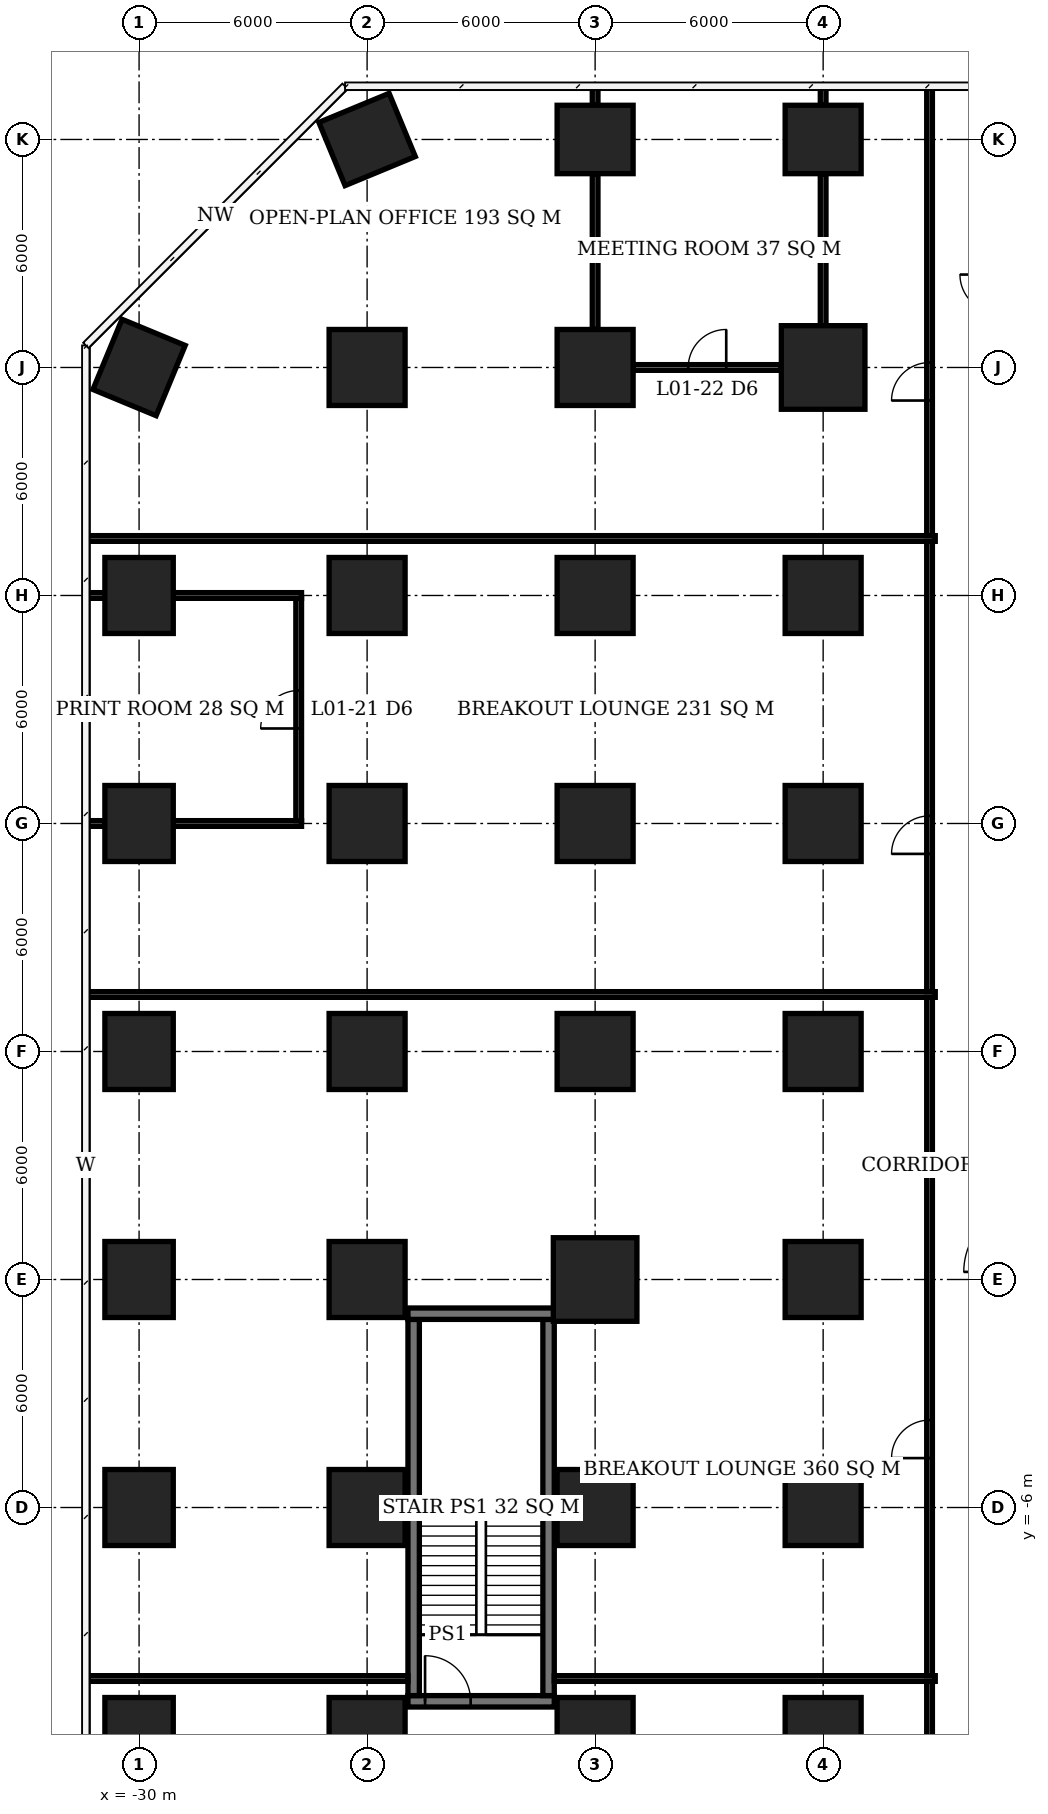
"""IFC4 building model, lengths in metres.
Left out: names, types, materials, properties, quantities, classifications, styles, units other than length and angle.
Written with IfcOpenShell. Run it as: python <this file> out.ifc"""

import sys

from ifc_helpers import new_model, si_unit, direction, frame, frame_2d, origin, origin_2d, place, context, subcontext, project, spatial, rectangle, extrude, element, fill, save


model = new_model("IFC4")
c1 = context("Model", 3, precision=1e-05, world=origin(), true_north=direction((0.0, 1.0)))
c2 = subcontext(c1, "Body", "Model", "MODEL_VIEW")
j1 = project(units=[si_unit("LENGTHUNIT", "METRE"), si_unit("PLANEANGLEUNIT", "RADIAN")], contexts=[c1])
p1 = place(None, origin())
s1 = spatial("IfcSite", under=j1, at=p1, CompositionType="ELEMENT")
p2 = place(p1, origin())
s2 = spatial("IfcBuilding", under=s1, at=p2, CompositionType="ELEMENT")
p3 = place(p2, frame((0.0, 0.0, 6.0)))
s3 = spatial("IfcBuildingStorey", under=s2, at=p3, CompositionType="ELEMENT", Elevation=6.0)
for number, where, z_axis, x_axis in (
    (1, (-30.0, -12.0, 0.0), (0.0, 0.0, 1.0), (0.0, 1.0, 0.0)),
    (2, (-30.0, -6.0, 0.0), (0.0, 0.0, 1.0), (0.0, 1.0, 0.0)),
    (3, (-30.0, 0.0, 0.0), (0.0, 0.0, 1.0), (0.0, 1.0, 0.0)),
    (4, (-30.0, 6.0, 0.0), (0.0, 0.0, 1.0), (0.0, 1.0, 0.0)),
    (5, (-30.0, 12.0, 0.0), (0.0, 0.0, 1.0), (0.0, 1.0, 0.0)),
    (6, (-30.0, 18.0, 0.0), (0.0, 0.0, 1.0), (0.0, 1.0, 0.0)),
    (7, (-30.0, 24.0, 0.0), (0.0, 0.0, 1.0), (0.383, 0.924, 0.0)),
):
    element("IfcColumn", number, at=place(p3, frame(where, z_axis=z_axis, x_axis=x_axis)), inside=s3, PredefinedType="COLUMN", context=c2, shape_type="SweptSolid", body=[
        extrude(rectangle(XDim=2.0, YDim=1.8, at=origin_2d()), origin(), (0.0, 0.0, 1.0), 5.0),
    ])
for number, where, z_axis, x_axis in (
    (8, (-24.0, -12.0, 0.0), (0.0, 0.0, 1.0), (1.0, 0.0, 0.0)),
    (9, (-24.0, -6.0, 0.0), (0.0, 0.0, 1.0), (1.0, 0.0, 0.0)),
    (10, (-24.0, 0.0, 0.0), (0.0, 0.0, 1.0), (1.0, 0.0, 0.0)),
    (11, (-24.0, 6.0, 0.0), (0.0, 0.0, 1.0), (1.0, 0.0, 0.0)),
    (12, (-24.0, 12.0, 0.0), (0.0, 0.0, 1.0), (1.0, 0.0, 0.0)),
    (13, (-24.0, 18.0, 0.0), (0.0, 0.0, 1.0), (1.0, 0.0, 0.0)),
    (14, (-24.0, 24.0, 0.0), (0.0, 0.0, 1.0), (1.0, 0.0, 0.0)),
):
    element("IfcColumn", number, at=place(p3, frame(where, z_axis=z_axis, x_axis=x_axis)), inside=s3, PredefinedType="COLUMN", context=c2, shape_type="SweptSolid", body=[
        extrude(rectangle(XDim=2.0, YDim=2.0, at=origin_2d()), origin(), (0.0, 0.0, 1.0), 5.0),
    ])
p4 = place(p3, frame((-24.0, 30.0, 0.0), z_axis=(0.0, 0.0, 1.0), x_axis=(0.923879532511, 0.382683432365, 0.0)))
e15 = element("IfcColumn", 15, at=p4, inside=s3, PredefinedType="COLUMN", context=c2, shape_type="SweptSolid", body=[
    extrude(rectangle(XDim=2.0, YDim=1.8, at=origin_2d()), origin(), (0.0, 0.0, 1.0), 5.0),
])
for number, where, z_axis, x_axis in (
    (16, (-18.0, -12.0, 0.0), (0.0, 0.0, 1.0), (1.0, 0.0, 0.0)),
    (17, (-18.0, -6.0, 0.0), (0.0, 0.0, 1.0), (1.0, 0.0, 0.0)),
):
    element("IfcColumn", number, at=place(p3, frame(where, z_axis=z_axis, x_axis=x_axis)), inside=s3, PredefinedType="COLUMN", context=c2, shape_type="SweptSolid", body=[
        extrude(rectangle(XDim=2.0, YDim=2.0, at=origin_2d()), origin(), (0.0, 0.0, 1.0), 5.0),
    ])
p5 = place(p3, frame((-18.0, 0.0, 0.0), z_axis=(0.0, 0.0, 1.0), x_axis=(1.0, 0.0, 0.0)))
e18 = element("IfcColumn", 18, at=p5, inside=s3, PredefinedType="COLUMN", context=c2, shape_type="SweptSolid", body=[
    extrude(rectangle(XDim=2.2, YDim=2.2, at=origin_2d()), origin(), (0.0, 0.0, 1.0), 5.0),
])
for number, where, z_axis, x_axis in (
    (19, (-18.0, 6.0, 0.0), (0.0, 0.0, 1.0), (1.0, 0.0, 0.0)),
    (20, (-18.0, 12.0, 0.0), (0.0, 0.0, 1.0), (1.0, 0.0, 0.0)),
    (21, (-18.0, 18.0, 0.0), (0.0, 0.0, 1.0), (1.0, 0.0, 0.0)),
    (22, (-18.0, 24.0, 0.0), (0.0, 0.0, 1.0), (1.0, 0.0, 0.0)),
):
    element("IfcColumn", number, at=place(p3, frame(where, z_axis=z_axis, x_axis=x_axis)), inside=s3, PredefinedType="COLUMN", context=c2, shape_type="SweptSolid", body=[
        extrude(rectangle(XDim=2.0, YDim=2.0, at=origin_2d()), origin(), (0.0, 0.0, 1.0), 5.0),
    ])
p6 = place(p3, frame((-18.0, 30.0, 0.0), z_axis=(0.0, 0.0, 1.0), x_axis=(1.0, 0.0, 0.0)))
e23 = element("IfcColumn", 23, at=p6, inside=s3, PredefinedType="COLUMN", context=c2, shape_type="SweptSolid", body=[
    extrude(rectangle(XDim=2.0, YDim=1.8, at=origin_2d()), origin(), (0.0, 0.0, 1.0), 5.0),
])
for number, where, z_axis, x_axis in (
    (24, (-12.0, -12.0, 0.0), (0.0, 0.0, 1.0), (1.0, 0.0, 0.0)),
    (25, (-12.0, -6.0, 0.0), (0.0, 0.0, 1.0), (1.0, 0.0, 0.0)),
    (26, (-12.0, 0.0, 0.0), (0.0, 0.0, 1.0), (1.0, 0.0, 0.0)),
    (27, (-12.0, 6.0, 0.0), (0.0, 0.0, 1.0), (1.0, 0.0, 0.0)),
    (28, (-12.0, 12.0, 0.0), (0.0, 0.0, 1.0), (1.0, 0.0, 0.0)),
    (29, (-12.0, 18.0, 0.0), (0.0, 0.0, 1.0), (1.0, 0.0, 0.0)),
):
    element("IfcColumn", number, at=place(p3, frame(where, z_axis=z_axis, x_axis=x_axis)), inside=s3, PredefinedType="COLUMN", context=c2, shape_type="SweptSolid", body=[
        extrude(rectangle(XDim=2.0, YDim=2.0, at=origin_2d()), origin(), (0.0, 0.0, 1.0), 5.0),
    ])
p7 = place(p3, frame((-12.0, 24.0, 0.0), z_axis=(0.0, 0.0, 1.0), x_axis=(1.0, 0.0, 0.0)))
e30 = element("IfcColumn", 30, at=p7, inside=s3, PredefinedType="COLUMN", context=c2, shape_type="SweptSolid", body=[
    extrude(rectangle(XDim=2.2, YDim=2.2, at=origin_2d()), origin(), (0.0, 0.0, 1.0), 5.0),
])
p8 = place(p3, frame((-12.0, 30.0, 0.0), z_axis=(0.0, 0.0, 1.0), x_axis=(1.0, 0.0, 0.0)))
e31 = element("IfcColumn", 31, at=p8, inside=s3, PredefinedType="COLUMN", context=c2, shape_type="SweptSolid", body=[
    extrude(rectangle(XDim=2.0, YDim=1.8, at=origin_2d()), origin(), (0.0, 0.0, 1.0), 5.0),
])
p9 = place(p3, frame((-22.925, -11.1, 0.0), z_axis=(0.0, 0.0, 1.0), x_axis=(1.0, 0.0, 0.0)))
e32 = element("IfcWall", 32, at=p9, inside=s3, PredefinedType="SOLIDWALL", context=c2, shape_type="SweptSolid", body=[
    extrude(rectangle(XDim=3.85, YDim=0.3, at=frame_2d((1.925, 0.0))), origin(), (0.0, 0.0, 1.0), 4.75),
])
p10 = place(p9, frame((0.45, 0.0, 0.0)))
e33 = element("IfcOpeningElement", 33, at=p10, cuts=e32, PredefinedType="OPENING", context=c2, shape_type="SweptSolid", body=[
    extrude(rectangle(XDim=1.2, YDim=2.1, at=frame_2d((0.6, 1.05))), frame((0.0, 0.16, 0.0), z_axis=(0.0, -1.0, 0.0), x_axis=(1.0, 0.0, 0.0)), (0.0, 0.0, 1.0), 0.32),
])
p11 = place(p3, frame((-22.925, -0.9, 0.0), z_axis=(0.0, 0.0, 1.0), x_axis=(1.0, 0.0, 0.0)))
e34 = element("IfcWall", 34, at=p11, inside=s3, PredefinedType="SOLIDWALL", context=c2, shape_type="SweptSolid", body=[
    extrude(rectangle(XDim=3.85, YDim=0.3, at=frame_2d((1.925, 0.0))), origin(), (0.0, 0.0, 1.0), 4.75),
])
for number, where, z_axis, x_axis in (
    (35, (-22.775, -10.95, 0.0), (0.0, 0.0, 1.0), (0.0, 1.0, 0.0)),
    (36, (-19.225, -10.95, 0.0), (0.0, 0.0, 1.0), (0.0, 1.0, 0.0)),
):
    element("IfcWall", number, at=place(p3, frame(where, z_axis=z_axis, x_axis=x_axis)), inside=s3, PredefinedType="SOLIDWALL", context=c2, shape_type="SweptSolid", body=[
        extrude(rectangle(XDim=9.9, YDim=0.3, at=frame_2d((4.95, 0.0))), origin(), (0.0, 0.0, 1.0), 4.75),
    ])
p12 = place(p3, frame((-31.375, 12.0, 0.0), z_axis=(0.0, 0.0, 1.0), x_axis=(1.0, 0.0, 0.0)))
e37 = element("IfcWall", 37, at=p12, inside=s3, PredefinedType="PARTITIONING", context=c2, shape_type="SweptSolid", body=[
    extrude(rectangle(XDim=0.475, YDim=0.15, at=frame_2d((0.238, 0.0))), origin(), (0.0, 0.0, 1.0), 4.75),
])
p13 = place(p3, frame((-29.1, 12.0, 0.0), z_axis=(0.0, 0.0, 1.0), x_axis=(1.0, 0.0, 0.0)))
e38 = element("IfcWall", 38, at=p13, inside=s3, PredefinedType="PARTITIONING", context=c2, shape_type="SweptSolid", body=[
    extrude(rectangle(XDim=3.375, YDim=0.15, at=frame_2d((1.688, 0.0))), origin(), (0.0, 0.0, 1.0), 4.75),
])
p14 = place(p3, frame((-31.375, 18.0, 0.0), z_axis=(0.0, 0.0, 1.0), x_axis=(1.0, 0.0, 0.0)))
e39 = element("IfcWall", 39, at=p14, inside=s3, PredefinedType="PARTITIONING", context=c2, shape_type="SweptSolid", body=[
    extrude(rectangle(XDim=0.475, YDim=0.15, at=frame_2d((0.238, 0.0))), origin(), (0.0, 0.0, 1.0), 4.75),
])
p15 = place(p3, frame((-29.1, 18.0, 0.0), z_axis=(0.0, 0.0, 1.0), x_axis=(1.0, 0.0, 0.0)))
e40 = element("IfcWall", 40, at=p15, inside=s3, PredefinedType="PARTITIONING", context=c2, shape_type="SweptSolid", body=[
    extrude(rectangle(XDim=3.375, YDim=0.15, at=frame_2d((1.688, 0.0))), origin(), (0.0, 0.0, 1.0), 4.75),
])
p16 = place(p3, frame((-17.0, 24.0, 0.0), z_axis=(0.0, 0.0, 1.0), x_axis=(1.0, 0.0, 0.0)))
e41 = element("IfcWall", 41, at=p16, inside=s3, PredefinedType="PARTITIONING", context=c2, shape_type="SweptSolid", body=[
    extrude(rectangle(XDim=3.9, YDim=0.15, at=frame_2d((1.95, 0.0))), origin(), (0.0, 0.0, 1.0), 4.75),
])
p17 = place(p16, frame((1.45, 0.0, 0.0)))
e42 = element("IfcOpeningElement", 42, at=p17, cuts=e41, PredefinedType="OPENING", context=c2, shape_type="SweptSolid", body=[
    extrude(rectangle(XDim=1.0, YDim=2.1, at=frame_2d((0.5, 1.05))), frame((0.0, 0.085, 0.0), z_axis=(0.0, -1.0, 0.0), x_axis=(1.0, 0.0, 0.0)), (0.0, 0.0, 1.0), 0.17),
])
p18 = place(p3, frame((-25.8, 12.075, 0.0), z_axis=(0.0, 0.0, 1.0), x_axis=(0.0, 1.0, 0.0)))
e43 = element("IfcWall", 43, at=p18, inside=s3, PredefinedType="PARTITIONING", context=c2, shape_type="SweptSolid", body=[
    extrude(rectangle(XDim=5.85, YDim=0.15, at=frame_2d((2.925, 0.0))), origin(), (0.0, 0.0, 1.0), 4.75),
])
p19 = place(p18, frame((2.425, 0.0, 0.0)))
e44 = element("IfcOpeningElement", 44, at=p19, cuts=e43, PredefinedType="OPENING", context=c2, shape_type="SweptSolid", body=[
    extrude(rectangle(XDim=1.0, YDim=2.1, at=frame_2d((0.5, 1.05))), frame((0.0, 0.085, 0.0), z_axis=(0.0, -1.0, 0.0), x_axis=(1.0, 0.0, 0.0)), (0.0, 0.0, 1.0), 0.17),
])
p20 = place(p3, frame((-18.0, 25.0, 0.0), z_axis=(0.0, 0.0, 1.0), x_axis=(0.0, 1.0, 0.0)))
e45 = element("IfcWall", 45, at=p20, inside=s3, PredefinedType="PARTITIONING", context=c2, shape_type="SweptSolid", body=[
    extrude(rectangle(XDim=4.1, YDim=0.15, at=frame_2d((2.05, 0.0))), origin(), (0.0, 0.0, 1.0), 4.75),
])
p21 = place(p3, frame((-18.0, 30.9, 0.0), z_axis=(0.0, 0.0, 1.0), x_axis=(0.0, 1.0, 0.0)))
e46 = element("IfcWall", 46, at=p21, inside=s3, PredefinedType="PARTITIONING", context=c2, shape_type="SweptSolid", body=[
    extrude(rectangle(XDim=0.475, YDim=0.15, at=frame_2d((0.238, 0.0))), origin(), (0.0, 0.0, 1.0), 4.75),
])
p22 = place(p3, frame((-12.0, 25.1, 0.0), z_axis=(0.0, 0.0, 1.0), x_axis=(0.0, 1.0, 0.0)))
e47 = element("IfcWall", 47, at=p22, inside=s3, PredefinedType="PARTITIONING", context=c2, shape_type="SweptSolid", body=[
    extrude(rectangle(XDim=4.0, YDim=0.15, at=frame_2d((2.0, 0.0))), origin(), (0.0, 0.0, 1.0), 4.75),
])
p23 = place(p3, frame((-12.0, 30.9, 0.0), z_axis=(0.0, 0.0, 1.0), x_axis=(0.0, 1.0, 0.0)))
e48 = element("IfcWall", 48, at=p23, inside=s3, PredefinedType="PARTITIONING", context=c2, shape_type="SweptSolid", body=[
    extrude(rectangle(XDim=0.475, YDim=0.15, at=frame_2d((0.238, 0.0))), origin(), (0.0, 0.0, 1.0), 4.75),
])
p24 = place(p3, frame((-31.375, -10.5, 0.0), z_axis=(0.0, 0.0, 1.0), x_axis=(1.0, 0.0, 0.0)))
e49 = element("IfcWall", 49, at=p24, inside=s3, PredefinedType="PARTITIONING", context=c2, shape_type="SweptSolid", body=[
    extrude(rectangle(XDim=8.45, YDim=0.15, at=frame_2d((4.225, 0.0))), origin(), (0.0, 0.0, 1.0), 4.75),
])
for number, where, z_axis, x_axis in (
    (50, (-31.375, 7.5, 0.0), (0.0, 0.0, 1.0), (1.0, 0.0, 0.0)),
    (51, (-31.375, 19.5, 0.0), (0.0, 0.0, 1.0), (1.0, 0.0, 0.0)),
):
    element("IfcWall", number, at=place(p3, frame(where, z_axis=z_axis, x_axis=x_axis)), inside=s3, PredefinedType="PARTITIONING", context=c2, shape_type="SweptSolid", body=[
        extrude(rectangle(XDim=22.325, YDim=0.15, at=frame_2d((11.163, 0.0))), origin(), (0.0, 0.0, 1.0), 4.75),
    ])
p25 = place(p3, frame((-19.075, -10.5, 0.0), z_axis=(0.0, 0.0, 1.0), x_axis=(1.0, 0.0, 0.0)))
e52 = element("IfcWall", 52, at=p25, inside=s3, PredefinedType="PARTITIONING", context=c2, shape_type="SweptSolid", body=[
    extrude(rectangle(XDim=10.025, YDim=0.15, at=frame_2d((5.012, 0.0))), origin(), (0.0, 0.0, 1.0), 4.75),
])
p26 = place(p3, frame((-9.2, -19.425, 0.0), z_axis=(0.0, 0.0, 1.0), x_axis=(0.0, 1.0, 0.0)))
e53 = element("IfcWall", 53, at=p26, inside=s3, PredefinedType="PARTITIONING", context=c2, shape_type="SweptSolid", body=[
    extrude(rectangle(XDim=8.85, YDim=0.15, at=frame_2d((4.425, 0.0))), origin(), (0.0, 0.0, 1.0), 4.75),
])
p27 = place(p26, frame((2.624, 0.0, 0.0)))
e54 = element("IfcOpeningElement", 54, at=p27, cuts=e53, PredefinedType="OPENING", context=c2, shape_type="SweptSolid", body=[
    extrude(rectangle(XDim=1.0, YDim=2.1, at=frame_2d((0.5, 1.05))), frame((0.0, 0.085, 0.0), z_axis=(0.0, -1.0, 0.0), x_axis=(1.0, 0.0, 0.0)), (0.0, 0.0, 1.0), 0.17),
])
p28 = place(p3, frame((-9.2, -10.425, 0.0), z_axis=(0.0, 0.0, 1.0), x_axis=(0.0, 1.0, 0.0)))
e55 = element("IfcWall", 55, at=p28, inside=s3, PredefinedType="PARTITIONING", context=c2, shape_type="SweptSolid", body=[
    extrude(rectangle(XDim=17.85, YDim=0.15, at=frame_2d((8.925, 0.0))), origin(), (0.0, 0.0, 1.0), 4.75),
])
p29 = place(p28, frame((5.725, 0.0, 0.0)))
e56 = element("IfcOpeningElement", 56, at=p29, cuts=e55, PredefinedType="OPENING", context=c2, shape_type="SweptSolid", body=[
    extrude(rectangle(XDim=1.0, YDim=2.1, at=frame_2d((0.5, 1.05))), frame((0.0, 0.085, 0.0), z_axis=(0.0, -1.0, 0.0), x_axis=(1.0, 0.0, 0.0)), (0.0, 0.0, 1.0), 0.17),
])
p30 = place(p3, frame((-9.2, 7.575, 0.0), z_axis=(0.0, 0.0, 1.0), x_axis=(0.0, 1.0, 0.0)))
e57 = element("IfcWall", 57, at=p30, inside=s3, PredefinedType="PARTITIONING", context=c2, shape_type="SweptSolid", body=[
    extrude(rectangle(XDim=11.85, YDim=0.15, at=frame_2d((5.925, 0.0))), origin(), (0.0, 0.0, 1.0), 4.75),
])
p31 = place(p30, frame((3.625, 0.0, 0.0)))
e58 = element("IfcOpeningElement", 58, at=p31, cuts=e57, PredefinedType="OPENING", context=c2, shape_type="SweptSolid", body=[
    extrude(rectangle(XDim=1.0, YDim=2.1, at=frame_2d((0.5, 1.05))), frame((0.0, 0.085, 0.0), z_axis=(0.0, -1.0, 0.0), x_axis=(1.0, 0.0, 0.0)), (0.0, 0.0, 1.0), 0.17),
])
p32 = place(p3, frame((-9.2, 19.575, 0.0), z_axis=(0.0, 0.0, 1.0), x_axis=(0.0, 1.0, 0.0)))
e59 = element("IfcWall", 59, at=p32, inside=s3, PredefinedType="PARTITIONING", context=c2, shape_type="SweptSolid", body=[
    extrude(rectangle(XDim=11.775, YDim=0.15, at=frame_2d((5.888, 0.0))), origin(), (0.0, 0.0, 1.0), 4.75),
])
p33 = place(p32, frame((3.555, 0.0, 0.0)))
e60 = element("IfcOpeningElement", 60, at=p33, cuts=e59, PredefinedType="OPENING", context=c2, shape_type="SweptSolid", body=[
    extrude(rectangle(XDim=1.0, YDim=2.1, at=frame_2d((0.5, 1.05))), frame((0.0, 0.085, 0.0), z_axis=(0.0, -1.0, 0.0), x_axis=(1.0, 0.0, 0.0)), (0.0, 0.0, 1.0), 0.17),
])
p34 = place(p10, origin())
e61 = element("IfcDoor", 61, at=p34, inside=s3, OperationType="SINGLE_SWING_LEFT", PredefinedType="DOOR", context=c2, shape_type="SweptSolid", body=[
    extrude(rectangle(XDim=1.2, YDim=2.1, at=frame_2d((0.6, 1.05))), frame((0.0, 0.025, 0.0), z_axis=(0.0, -1.0, 0.0), x_axis=(1.0, 0.0, 0.0)), (0.0, 0.0, 1.0), 0.05),
])
fill(e33, e61)
p35 = place(p19, origin())
e62 = element("IfcDoor", 62, at=p35, inside=s3, OperationType="SINGLE_SWING_LEFT", PredefinedType="DOOR", context=c2, shape_type="SweptSolid", body=[
    extrude(rectangle(XDim=1.0, YDim=2.1, at=frame_2d((0.5, 1.05))), frame((0.0, 0.025, 0.0), z_axis=(0.0, -1.0, 0.0), x_axis=(1.0, 0.0, 0.0)), (0.0, 0.0, 1.0), 0.05),
])
fill(e44, e62)
p36 = place(p17, origin())
e63 = element("IfcDoor", 63, at=p36, inside=s3, OperationType="SINGLE_SWING_RIGHT", PredefinedType="DOOR", context=c2, shape_type="SweptSolid", body=[
    extrude(rectangle(XDim=1.0, YDim=2.1, at=frame_2d((0.5, 1.05))), frame((0.0, 0.025, 0.0), z_axis=(0.0, -1.0, 0.0), x_axis=(1.0, 0.0, 0.0)), (0.0, 0.0, 1.0), 0.05),
])
fill(e42, e63)
p37 = place(p29, origin())
e64 = element("IfcDoor", 64, at=p37, inside=s3, OperationType="SINGLE_SWING_LEFT", PredefinedType="DOOR", context=c2, shape_type="SweptSolid", body=[
    extrude(rectangle(XDim=1.0, YDim=2.1, at=frame_2d((0.5, 1.05))), frame((0.0, 0.025, 0.0), z_axis=(0.0, -1.0, 0.0), x_axis=(1.0, 0.0, 0.0)), (0.0, 0.0, 1.0), 0.05),
])
fill(e56, e64)
p38 = place(p31, origin())
e65 = element("IfcDoor", 65, at=p38, inside=s3, OperationType="SINGLE_SWING_LEFT", PredefinedType="DOOR", context=c2, shape_type="SweptSolid", body=[
    extrude(rectangle(XDim=1.0, YDim=2.1, at=frame_2d((0.5, 1.05))), frame((0.0, 0.025, 0.0), z_axis=(0.0, -1.0, 0.0), x_axis=(1.0, 0.0, 0.0)), (0.0, 0.0, 1.0), 0.05),
])
fill(e58, e65)
p39 = place(p33, origin())
e66 = element("IfcDoor", 66, at=p39, inside=s3, OperationType="SINGLE_SWING_LEFT", PredefinedType="DOOR", context=c2, shape_type="SweptSolid", body=[
    extrude(rectangle(XDim=1.0, YDim=2.1, at=frame_2d((0.5, 1.05))), frame((0.0, 0.025, 0.0), z_axis=(0.0, -1.0, 0.0), x_axis=(1.0, 0.0, 0.0)), (0.0, 0.0, 1.0), 0.05),
])
fill(e60, e66)
save(model, sys.argv[1])
